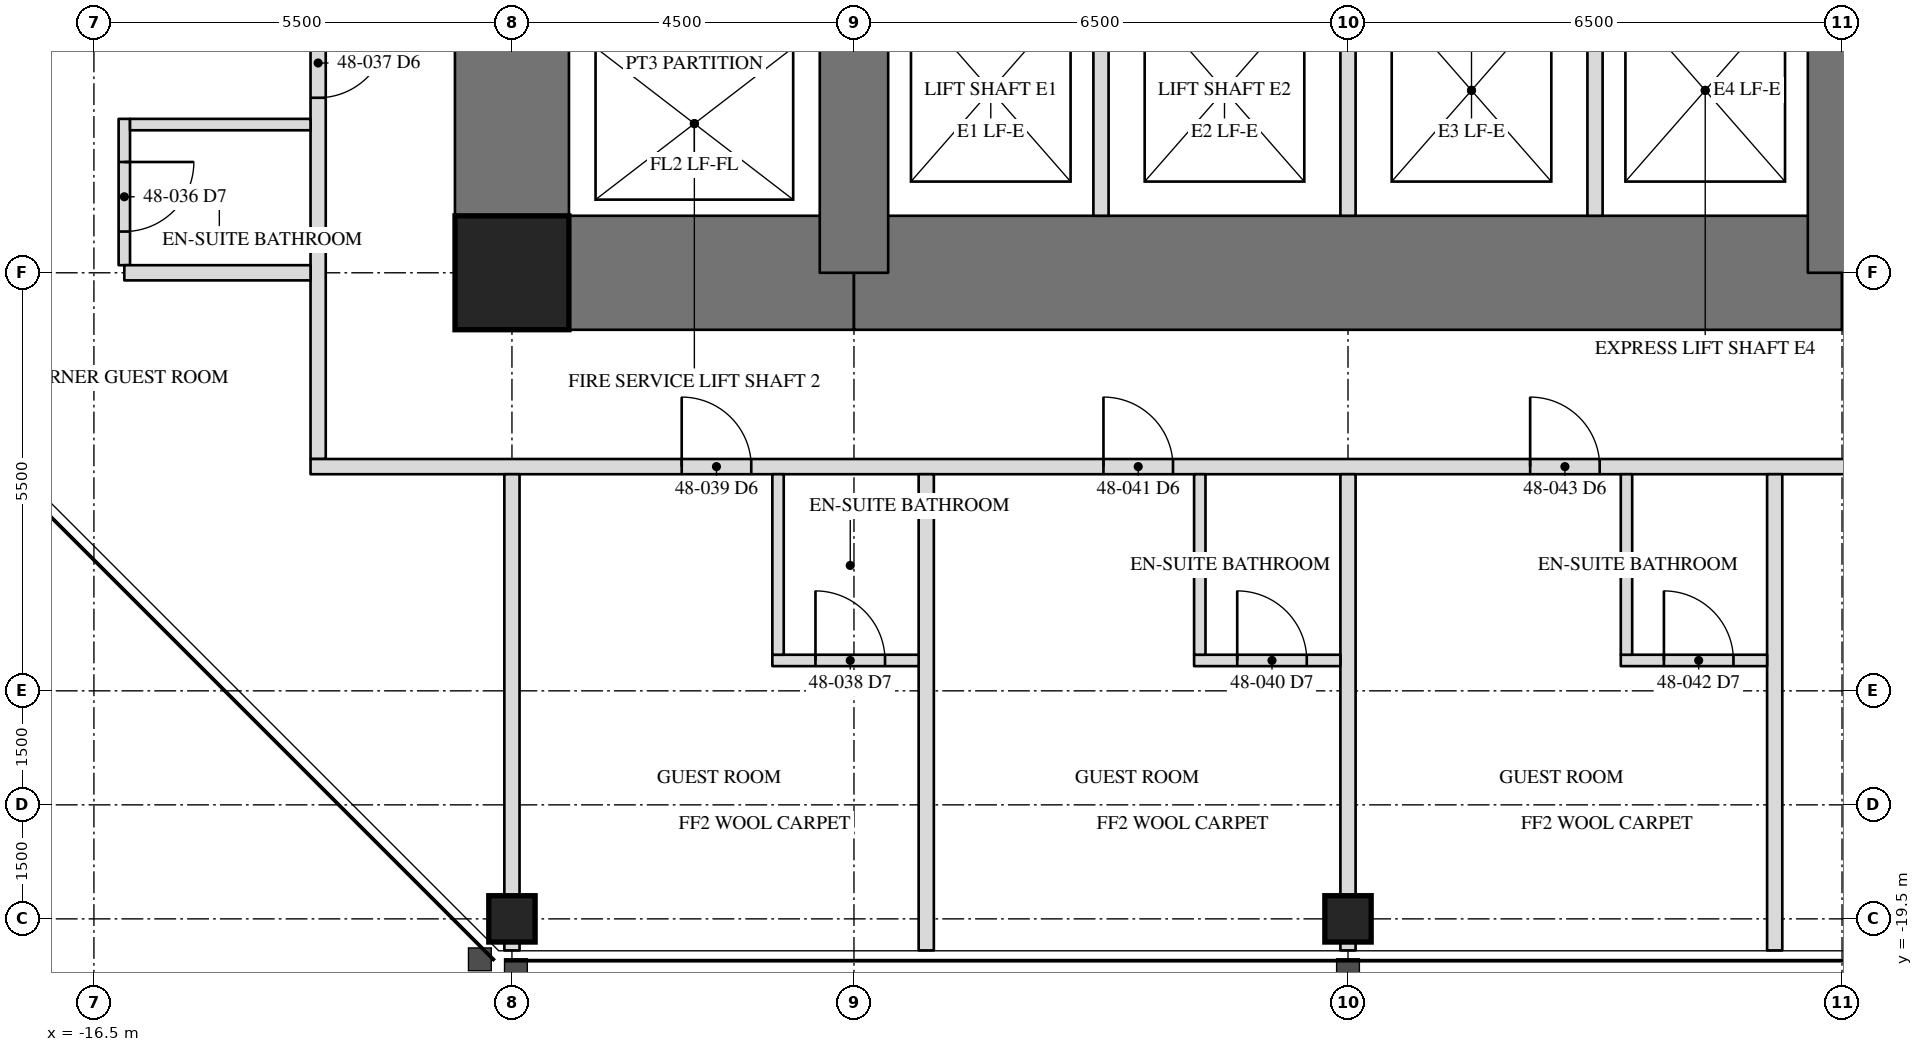
"""IFC4 building model, lengths in metres.
Left out: names, types, materials, properties, quantities, classifications, styles, units other than length and angle.
Written with IfcOpenShell. Run it as: python <this file> out.ifc"""

import sys

from ifc_helpers import new_model, si_unit, direction, frame, frame_2d, origin, origin_2d, place, context, subcontext, project, spatial, rectangle, hollow_rectangle, extrude, element, fill, save


model = new_model("IFC4")
c1 = context("Model", 3, precision=1e-05, world=origin(), true_north=direction((0.0, 1.0)))
c2 = subcontext(c1, "Body", "Model", "MODEL_VIEW")
j1 = project(units=[si_unit("LENGTHUNIT", "METRE"), si_unit("PLANEANGLEUNIT", "RADIAN")], contexts=[c1])
p1 = place(None, origin())
s1 = spatial("IfcSite", under=j1, at=p1, CompositionType="ELEMENT")
p2 = place(p1, origin())
s2 = spatial("IfcBuilding", under=s1, at=p2, CompositionType="ELEMENT")
p3 = place(p2, frame((0.0, 0.0, 204.7)))
s3 = spatial("IfcBuildingStorey", under=s2, at=p3, CompositionType="ELEMENT", Elevation=204.7)
for number, where, z_axis, x_axis in (
    (1, (-11.0, -19.5, 0.0), (0.0, 0.0, 1.0), (1.0, 0.0, 0.0)),
    (2, (0.0, -19.5, 0.0), (0.0, 0.0, 1.0), (1.0, 0.0, 0.0)),
):
    element("IfcColumn", number, at=place(p3, frame(where, z_axis=z_axis, x_axis=x_axis)), inside=s3, PredefinedType="COLUMN", context=c2, shape_type="SweptSolid", body=[
        extrude(hollow_rectangle(XDim=0.61, YDim=0.61, WallThickness=0.076, at=origin_2d()), origin(), (0.0, 0.0, 1.0), 3.5),
    ])
p4 = place(p3, frame((-11.0, 11.0, 0.0), z_axis=(0.0, 0.0, 1.0), x_axis=(0.0, -1.0, 0.0)))
e3 = element("IfcWall", 3, at=p4, inside=s3, PredefinedType="SHEAR", context=c2, shape_type="SweptSolid", body=[
    extrude(rectangle(XDim=22.0, YDim=1.5, at=frame_2d((11.0, 0.0))), origin(), (0.0, 0.0, 1.0), 3.5),
])
p5 = place(p4, frame((15.393, 0.0, 0.0)))
e4 = element("IfcOpeningElement", 4, at=p5, cuts=e3, PredefinedType="OPENING", context=c2, shape_type="SweptSolid", body=[
    extrude(rectangle(XDim=0.915, YDim=2.134, at=frame_2d((0.458, 1.067))), frame((0.0, 0.76, 0.0), z_axis=(0.0, -1.0, 0.0), x_axis=(1.0, 0.0, 0.0)), (0.0, 0.0, 1.0), 1.52),
])
p6 = place(p3, frame((-11.0, -11.0, 0.0), z_axis=(0.0, 0.0, 1.0), x_axis=(1.0, 0.0, 0.0)))
e5 = element("IfcWall", 5, at=p6, inside=s3, PredefinedType="SHEAR", context=c2, shape_type="SweptSolid", body=[
    extrude(rectangle(XDim=4.5, YDim=1.5, at=frame_2d((2.25, 0.0))), origin(), (0.0, 0.0, 1.0), 3.5),
])
p7 = place(p3, frame((-6.5, -11.0, 0.0), z_axis=(0.0, 0.0, 1.0), x_axis=(1.0, 0.0, 0.0)))
e6 = element("IfcWall", 6, at=p7, inside=s3, PredefinedType="SHEAR", context=c2, shape_type="SweptSolid", body=[
    extrude(rectangle(XDim=13.0, YDim=1.5, at=frame_2d((6.5, 0.0))), origin(), (0.0, 0.0, 1.0), 3.5),
])
p8 = place(p3, frame((6.5, -11.0, 0.0), z_axis=(0.0, 0.0, 1.0), x_axis=(1.0, 0.0, 0.0)))
e7 = element("IfcWall", 7, at=p8, inside=s3, PredefinedType="SHEAR", context=c2, shape_type="SweptSolid", body=[
    extrude(rectangle(XDim=4.5, YDim=1.5, at=frame_2d((2.25, 0.0))), origin(), (0.0, 0.0, 1.0), 3.5),
])
for number, where, z_axis, x_axis in (
    (8, (6.5, -11.0, 0.0), (0.0, 0.0, 1.0), (0.0, 1.0, 0.0)),
    (9, (-6.5, -6.5, 0.0), (0.0, 0.0, 1.0), (0.0, -1.0, 0.0)),
):
    element("IfcWall", number, at=place(p3, frame(where, z_axis=z_axis, x_axis=x_axis)), inside=s3, PredefinedType="SHEAR", context=c2, shape_type="SweptSolid", body=[
        extrude(rectangle(XDim=4.5, YDim=0.9, at=frame_2d((2.25, 0.0))), origin(), (0.0, 0.0, 1.0), 3.5),
    ])
p9 = place(p3, frame((-11.0, -11.0, 0.0), z_axis=(0.0, 0.0, 1.0), x_axis=(1.0, 0.0, 0.0)))
e10 = element("IfcColumn", 10, at=p9, inside=s3, PredefinedType="COLUMN", context=c2, shape_type="SweptSolid", body=[
    extrude(hollow_rectangle(XDim=1.499, YDim=1.499, WallThickness=0.102, at=origin_2d()), origin(), (0.0, 0.0, 1.0), 3.5),
])
for number, where, z_axis, x_axis in (
    (11, (-3.25, -10.25, 0.0), (0.0, 0.0, 1.0), (0.0, 1.0, 0.0)),
    (12, (0.0, -10.25, 0.0), (0.0, 0.0, 1.0), (0.0, 1.0, 0.0)),
    (13, (3.25, -10.25, 0.0), (0.0, 0.0, 1.0), (0.0, 1.0, 0.0)),
):
    element("IfcWall", number, at=place(p3, frame(where, z_axis=z_axis, x_axis=x_axis)), inside=s3, PredefinedType="PARTITIONING", context=c2, shape_type="SweptSolid", body=[
        extrude(rectangle(XDim=3.3, YDim=0.2, at=frame_2d((1.65, 0.0))), origin(), (0.0, 0.0, 1.0), 3.31),
    ])
p10 = place(p3, frame((-13.55, 13.65, 0.0), z_axis=(0.0, 0.0, 1.0), x_axis=(0.0, -1.0, 0.0)))
e14 = element("IfcWall", 14, at=p10, inside=s3, PredefinedType="PARTITIONING", context=c2, shape_type="SweptSolid", body=[
    extrude(rectangle(XDim=27.1, YDim=0.2, at=frame_2d((13.55, 0.0))), origin(), (0.0, 0.0, 1.0), 3.31),
])
p11 = place(p10, frame((4.884, 0.0, 0.0)))
e15 = element("IfcOpeningElement", 15, at=p11, cuts=e14, PredefinedType="OPENING", context=c2, shape_type="SweptSolid", body=[
    extrude(rectangle(XDim=0.915, YDim=2.134, at=frame_2d((0.458, 1.067))), frame((0.0, 0.11, 0.0), z_axis=(0.0, -1.0, 0.0), x_axis=(1.0, 0.0, 0.0)), (0.0, 0.0, 1.0), 0.22),
])
p12 = place(p10, frame((10.433, 0.0, 0.0)))
e16 = element("IfcOpeningElement", 16, at=p12, cuts=e14, PredefinedType="OPENING", context=c2, shape_type="SweptSolid", body=[
    extrude(rectangle(XDim=0.915, YDim=2.134, at=frame_2d((0.458, 1.067))), frame((0.0, 0.11, 0.0), z_axis=(0.0, -1.0, 0.0), x_axis=(1.0, 0.0, 0.0)), (0.0, 0.0, 1.0), 0.22),
])
p13 = place(p10, frame((16.046, 0.0, 0.0)))
e17 = element("IfcOpeningElement", 17, at=p13, cuts=e14, PredefinedType="OPENING", context=c2, shape_type="SweptSolid", body=[
    extrude(rectangle(XDim=0.915, YDim=2.134, at=frame_2d((0.458, 1.067))), frame((0.0, 0.11, 0.0), z_axis=(0.0, -1.0, 0.0), x_axis=(1.0, 0.0, 0.0)), (0.0, 0.0, 1.0), 0.22),
])
p14 = place(p10, frame((21.433, 0.0, 0.0)))
e18 = element("IfcOpeningElement", 18, at=p14, cuts=e14, PredefinedType="OPENING", context=c2, shape_type="SweptSolid", body=[
    extrude(rectangle(XDim=0.915, YDim=2.134, at=frame_2d((0.458, 1.067))), frame((0.0, 0.11, 0.0), z_axis=(0.0, -1.0, 0.0), x_axis=(1.0, 0.0, 0.0)), (0.0, 0.0, 1.0), 0.22),
])
p15 = place(p3, frame((-13.65, -13.55, 0.0), z_axis=(0.0, 0.0, 1.0), x_axis=(1.0, 0.0, 0.0)))
e19 = element("IfcWall", 19, at=p15, inside=s3, PredefinedType="PARTITIONING", context=c2, shape_type="SweptSolid", body=[
    extrude(rectangle(XDim=27.1, YDim=0.2, at=frame_2d((13.55, 0.0))), origin(), (0.0, 0.0, 1.0), 3.31),
])
p16 = place(p15, frame((4.884, 0.0, 0.0)))
e20 = element("IfcOpeningElement", 20, at=p16, cuts=e19, PredefinedType="OPENING", context=c2, shape_type="SweptSolid", body=[
    extrude(rectangle(XDim=0.915, YDim=2.134, at=frame_2d((0.458, 1.067))), frame((0.0, 0.11, 0.0), z_axis=(0.0, -1.0, 0.0), x_axis=(1.0, 0.0, 0.0)), (0.0, 0.0, 1.0), 0.22),
])
p17 = place(p15, frame((10.433, 0.0, 0.0)))
e21 = element("IfcOpeningElement", 21, at=p17, cuts=e19, PredefinedType="OPENING", context=c2, shape_type="SweptSolid", body=[
    extrude(rectangle(XDim=0.915, YDim=2.134, at=frame_2d((0.458, 1.067))), frame((0.0, 0.11, 0.0), z_axis=(0.0, -1.0, 0.0), x_axis=(1.0, 0.0, 0.0)), (0.0, 0.0, 1.0), 0.22),
])
p18 = place(p15, frame((16.046, 0.0, 0.0)))
e22 = element("IfcOpeningElement", 22, at=p18, cuts=e19, PredefinedType="OPENING", context=c2, shape_type="SweptSolid", body=[
    extrude(rectangle(XDim=0.915, YDim=2.134, at=frame_2d((0.458, 1.067))), frame((0.0, 0.11, 0.0), z_axis=(0.0, -1.0, 0.0), x_axis=(1.0, 0.0, 0.0)), (0.0, 0.0, 1.0), 0.22),
])
p19 = place(p15, frame((21.433, 0.0, 0.0)))
e23 = element("IfcOpeningElement", 23, at=p19, cuts=e19, PredefinedType="OPENING", context=c2, shape_type="SweptSolid", body=[
    extrude(rectangle(XDim=0.915, YDim=2.134, at=frame_2d((0.458, 1.067))), frame((0.0, 0.11, 0.0), z_axis=(0.0, -1.0, 0.0), x_axis=(1.0, 0.0, 0.0)), (0.0, 0.0, 1.0), 0.22),
])
p20 = place(p3, frame((-16.1, -8.975, 0.0), z_axis=(0.0, 0.0, 1.0), x_axis=(0.0, -1.0, 0.0)))
e24 = element("IfcWall", 24, at=p20, inside=s3, PredefinedType="PARTITIONING", context=c2, shape_type="SweptSolid", body=[
    extrude(rectangle(XDim=1.925, YDim=0.15, at=frame_2d((0.962, 0.0))), origin(), (0.0, 0.0, 1.0), 3.31),
])
p21 = place(p20, frame((0.567, 0.0, 0.0)))
e25 = element("IfcOpeningElement", 25, at=p21, cuts=e24, PredefinedType="OPENING", context=c2, shape_type="SweptSolid", body=[
    extrude(rectangle(XDim=0.915, YDim=2.032, at=frame_2d((0.458, 1.016))), frame((0.0, 0.085, 0.0), z_axis=(0.0, -1.0, 0.0), x_axis=(1.0, 0.0, 0.0)), (0.0, 0.0, 1.0), 0.17),
])
p22 = place(p3, frame((-13.65, -9.05, 0.0), z_axis=(0.0, 0.0, 1.0), x_axis=(-1.0, 0.0, 0.0)))
e26 = element("IfcWall", 26, at=p22, inside=s3, PredefinedType="PARTITIONING", context=c2, shape_type="SweptSolid", body=[
    extrude(rectangle(XDim=2.375, YDim=0.15, at=frame_2d((1.188, 0.0))), origin(), (0.0, 0.0, 1.0), 3.31),
])
p23 = place(p3, frame((-13.65, -11.0, 0.0), z_axis=(0.0, 0.0, 1.0), x_axis=(-1.0, 0.0, 0.0)))
e27 = element("IfcWall", 27, at=p23, inside=s3, PredefinedType="PARTITIONING", context=c2, shape_type="SweptSolid", body=[
    extrude(rectangle(XDim=2.45, YDim=0.2, at=frame_2d((1.225, 0.0))), origin(), (0.0, 0.0, 1.0), 2.802),
])
p24 = place(p3, frame((-11.0, -13.65, 0.0), z_axis=(0.0, 0.0, 1.0), x_axis=(0.0, -1.0, 0.0)))
e28 = element("IfcWall", 28, at=p24, inside=s3, PredefinedType="PARTITIONING", context=c2, shape_type="SweptSolid", body=[
    extrude(rectangle(XDim=6.265, YDim=0.2, at=frame_2d((3.133, 0.0))), origin(), (0.0, 0.0, 1.0), 2.802),
])
p25 = place(p3, frame((-5.549, -13.65, 0.0), z_axis=(0.0, 0.0, 1.0), x_axis=(0.0, -1.0, 0.0)))
e29 = element("IfcWall", 29, at=p25, inside=s3, PredefinedType="PARTITIONING", context=c2, shape_type="SweptSolid", body=[
    extrude(rectangle(XDim=6.265, YDim=0.2, at=frame_2d((3.133, 0.0))), origin(), (0.0, 0.0, 1.0), 3.31),
])
p26 = place(p3, frame((0.0, -13.65, 0.0), z_axis=(0.0, 0.0, 1.0), x_axis=(0.0, -1.0, 0.0)))
e30 = element("IfcWall", 30, at=p26, inside=s3, PredefinedType="PARTITIONING", context=c2, shape_type="SweptSolid", body=[
    extrude(rectangle(XDim=6.265, YDim=0.2, at=frame_2d((3.133, 0.0))), origin(), (0.0, 0.0, 1.0), 2.802),
])
p27 = place(p3, frame((5.614, -13.65, 0.0), z_axis=(0.0, 0.0, 1.0), x_axis=(0.0, -1.0, 0.0)))
e31 = element("IfcWall", 31, at=p27, inside=s3, PredefinedType="PARTITIONING", context=c2, shape_type="SweptSolid", body=[
    extrude(rectangle(XDim=6.265, YDim=0.2, at=frame_2d((3.133, 0.0))), origin(), (0.0, 0.0, 1.0), 3.31),
])
p28 = place(p3, frame((-7.574, -16.1, 0.0), z_axis=(0.0, 0.0, 1.0), x_axis=(1.0, 0.0, 0.0)))
e32 = element("IfcWall", 32, at=p28, inside=s3, PredefinedType="PARTITIONING", context=c2, shape_type="SweptSolid", body=[
    extrude(rectangle(XDim=1.925, YDim=0.15, at=frame_2d((0.962, 0.0))), origin(), (0.0, 0.0, 1.0), 3.31),
])
p29 = place(p28, frame((0.567, 0.0, 0.0)))
e33 = element("IfcOpeningElement", 33, at=p29, cuts=e32, PredefinedType="OPENING", context=c2, shape_type="SweptSolid", body=[
    extrude(rectangle(XDim=0.915, YDim=2.032, at=frame_2d((0.458, 1.016))), frame((0.0, 0.085, 0.0), z_axis=(0.0, -1.0, 0.0), x_axis=(1.0, 0.0, 0.0)), (0.0, 0.0, 1.0), 0.17),
])
p30 = place(p3, frame((-7.499, -13.65, 0.0), z_axis=(0.0, 0.0, 1.0), x_axis=(0.0, -1.0, 0.0)))
e34 = element("IfcWall", 34, at=p30, inside=s3, PredefinedType="PARTITIONING", context=c2, shape_type="SweptSolid", body=[
    extrude(rectangle(XDim=2.375, YDim=0.15, at=frame_2d((1.188, 0.0))), origin(), (0.0, 0.0, 1.0), 3.31),
])
p31 = place(p3, frame((-2.025, -16.1, 0.0), z_axis=(0.0, 0.0, 1.0), x_axis=(1.0, 0.0, 0.0)))
e35 = element("IfcWall", 35, at=p31, inside=s3, PredefinedType="PARTITIONING", context=c2, shape_type="SweptSolid", body=[
    extrude(rectangle(XDim=1.925, YDim=0.15, at=frame_2d((0.962, 0.0))), origin(), (0.0, 0.0, 1.0), 3.31),
])
p32 = place(p31, frame((0.567, 0.0, 0.0)))
e36 = element("IfcOpeningElement", 36, at=p32, cuts=e35, PredefinedType="OPENING", context=c2, shape_type="SweptSolid", body=[
    extrude(rectangle(XDim=0.915, YDim=2.032, at=frame_2d((0.458, 1.016))), frame((0.0, 0.085, 0.0), z_axis=(0.0, -1.0, 0.0), x_axis=(1.0, 0.0, 0.0)), (0.0, 0.0, 1.0), 0.17),
])
p33 = place(p3, frame((-1.95, -13.65, 0.0), z_axis=(0.0, 0.0, 1.0), x_axis=(0.0, -1.0, 0.0)))
e37 = element("IfcWall", 37, at=p33, inside=s3, PredefinedType="PARTITIONING", context=c2, shape_type="SweptSolid", body=[
    extrude(rectangle(XDim=2.375, YDim=0.15, at=frame_2d((1.188, 0.0))), origin(), (0.0, 0.0, 1.0), 3.31),
])
p34 = place(p3, frame((3.589, -16.1, 0.0), z_axis=(0.0, 0.0, 1.0), x_axis=(1.0, 0.0, 0.0)))
e38 = element("IfcWall", 38, at=p34, inside=s3, PredefinedType="PARTITIONING", context=c2, shape_type="SweptSolid", body=[
    extrude(rectangle(XDim=1.925, YDim=0.15, at=frame_2d((0.962, 0.0))), origin(), (0.0, 0.0, 1.0), 3.31),
])
p35 = place(p34, frame((0.567, 0.0, 0.0)))
e39 = element("IfcOpeningElement", 39, at=p35, cuts=e38, PredefinedType="OPENING", context=c2, shape_type="SweptSolid", body=[
    extrude(rectangle(XDim=0.915, YDim=2.032, at=frame_2d((0.458, 1.016))), frame((0.0, 0.085, 0.0), z_axis=(0.0, -1.0, 0.0), x_axis=(1.0, 0.0, 0.0)), (0.0, 0.0, 1.0), 0.17),
])
p36 = place(p3, frame((3.664, -13.65, 0.0), z_axis=(0.0, 0.0, 1.0), x_axis=(0.0, -1.0, 0.0)))
e40 = element("IfcWall", 40, at=p36, inside=s3, PredefinedType="PARTITIONING", context=c2, shape_type="SweptSolid", body=[
    extrude(rectangle(XDim=2.375, YDim=0.15, at=frame_2d((1.188, 0.0))), origin(), (0.0, 0.0, 1.0), 2.703),
])
p37 = place(p21, origin())
e41 = element("IfcDoor", 41, at=p37, inside=s3, OperationType="SINGLE_SWING_LEFT", PredefinedType="DOOR", context=c2, shape_type="SweptSolid", body=[
    extrude(rectangle(XDim=0.915, YDim=2.032, at=frame_2d((0.458, 1.016))), frame((0.0, 0.025, 0.0), z_axis=(0.0, -1.0, 0.0), x_axis=(1.0, 0.0, 0.0)), (0.0, 0.0, 1.0), 0.05),
])
fill(e25, e41)
p38 = place(p14, origin())
e42 = element("IfcDoor", 42, at=p38, inside=s3, OperationType="SINGLE_SWING_LEFT", PredefinedType="DOOR", context=c2, shape_type="SweptSolid", body=[
    extrude(rectangle(XDim=0.915, YDim=2.134, at=frame_2d((0.458, 1.067))), frame((0.0, 0.025, 0.0), z_axis=(0.0, -1.0, 0.0), x_axis=(1.0, 0.0, 0.0)), (0.0, 0.0, 1.0), 0.05),
])
fill(e18, e42)
p39 = place(p29, origin())
e43 = element("IfcDoor", 43, at=p39, inside=s3, OperationType="SINGLE_SWING_LEFT", PredefinedType="DOOR", context=c2, shape_type="SweptSolid", body=[
    extrude(rectangle(XDim=0.915, YDim=2.032, at=frame_2d((0.458, 1.016))), frame((0.0, 0.025, 0.0), z_axis=(0.0, -1.0, 0.0), x_axis=(1.0, 0.0, 0.0)), (0.0, 0.0, 1.0), 0.05),
])
fill(e33, e43)
p40 = place(p16, origin())
e44 = element("IfcDoor", 44, at=p40, inside=s3, OperationType="SINGLE_SWING_LEFT", PredefinedType="DOOR", context=c2, shape_type="SweptSolid", body=[
    extrude(rectangle(XDim=0.915, YDim=2.134, at=frame_2d((0.458, 1.067))), frame((0.0, 0.025, 0.0), z_axis=(0.0, -1.0, 0.0), x_axis=(1.0, 0.0, 0.0)), (0.0, 0.0, 1.0), 0.05),
])
fill(e20, e44)
p41 = place(p32, origin())
e45 = element("IfcDoor", 45, at=p41, inside=s3, OperationType="SINGLE_SWING_LEFT", PredefinedType="DOOR", context=c2, shape_type="SweptSolid", body=[
    extrude(rectangle(XDim=0.915, YDim=2.032, at=frame_2d((0.458, 1.016))), frame((0.0, 0.025, 0.0), z_axis=(0.0, -1.0, 0.0), x_axis=(1.0, 0.0, 0.0)), (0.0, 0.0, 1.0), 0.05),
])
fill(e36, e45)
p42 = place(p17, origin())
e46 = element("IfcDoor", 46, at=p42, inside=s3, OperationType="SINGLE_SWING_LEFT", PredefinedType="DOOR", context=c2, shape_type="SweptSolid", body=[
    extrude(rectangle(XDim=0.915, YDim=2.134, at=frame_2d((0.458, 1.067))), frame((0.0, 0.025, 0.0), z_axis=(0.0, -1.0, 0.0), x_axis=(1.0, 0.0, 0.0)), (0.0, 0.0, 1.0), 0.05),
])
fill(e21, e46)
p43 = place(p35, origin())
e47 = element("IfcDoor", 47, at=p43, inside=s3, OperationType="SINGLE_SWING_LEFT", PredefinedType="DOOR", context=c2, shape_type="SweptSolid", body=[
    extrude(rectangle(XDim=0.915, YDim=2.032, at=frame_2d((0.458, 1.016))), frame((0.0, 0.025, 0.0), z_axis=(0.0, -1.0, 0.0), x_axis=(1.0, 0.0, 0.0)), (0.0, 0.0, 1.0), 0.05),
])
fill(e39, e47)
p44 = place(p18, origin())
e48 = element("IfcDoor", 48, at=p44, inside=s3, OperationType="SINGLE_SWING_LEFT", PredefinedType="DOOR", context=c2, shape_type="SweptSolid", body=[
    extrude(rectangle(XDim=0.915, YDim=2.134, at=frame_2d((0.458, 1.067))), frame((0.0, 0.025, 0.0), z_axis=(0.0, -1.0, 0.0), x_axis=(1.0, 0.0, 0.0)), (0.0, 0.0, 1.0), 0.05),
])
fill(e22, e48)
save(model, sys.argv[1])
